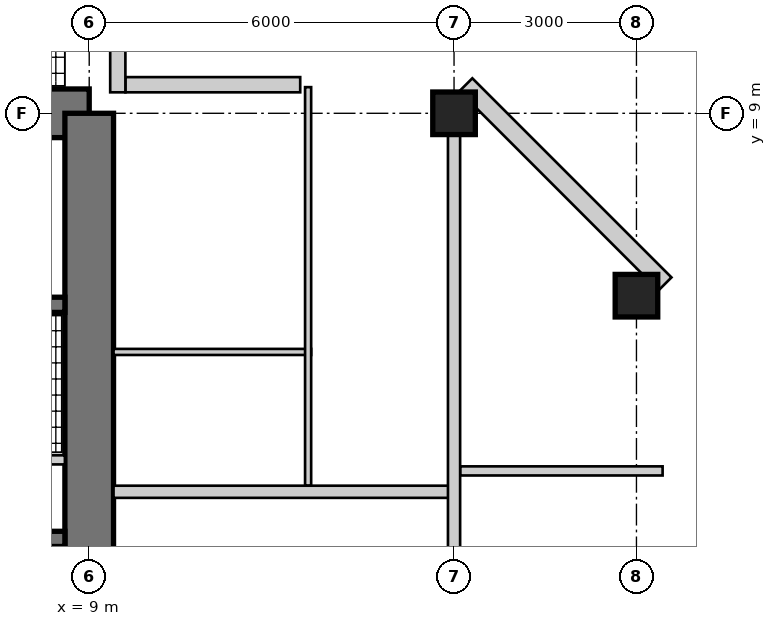
"""IFC4 building model, lengths in metres.
Left out: names, types, materials, properties, quantities, classifications, styles, units other than length and angle.
Written with IfcOpenShell. Run it as: python <this file> out.ifc"""

import sys

from ifc_helpers import new_model, si_unit, direction, frame, frame_2d, origin, origin_2d, place, context, subcontext, project, spatial, rectangle, hollow_rectangle, extrude, element, fill, save


model = new_model("IFC4")
c1 = context("Model", 3, precision=1e-05, world=origin(), true_north=direction((0.0, 1.0)))
c2 = subcontext(c1, "Body", "Model", "MODEL_VIEW")
j1 = project(units=[si_unit("LENGTHUNIT", "METRE"), si_unit("PLANEANGLEUNIT", "RADIAN")], contexts=[c1])
p1 = place(None, origin())
s1 = spatial("IfcSite", under=j1, at=p1, CompositionType="ELEMENT")
p2 = place(p1, origin())
s2 = spatial("IfcBuilding", under=s1, at=p2, CompositionType="ELEMENT")
p3 = place(p2, frame((0.0, 0.0, 278.1)))
s3 = spatial("IfcBuildingStorey", under=s2, at=p3, CompositionType="ELEMENT", Elevation=278.1)
p4 = place(p3, frame((9.0, 9.0, 0.0), z_axis=(0.0, 0.0, 1.0), x_axis=(-1.0, 0.0, 0.0)))
e1 = element("IfcWall", 1, at=p4, inside=s3, PredefinedType="SHEAR", context=c2, shape_type="SweptSolid", body=[
    extrude(rectangle(XDim=18.0, YDim=0.8, at=frame_2d((9.0, 0.0))), origin(), (0.0, 0.0, 1.0), 3.4),
])
p5 = place(p4, frame((9.8, 0.0, 0.0)))
e2 = element("IfcOpeningElement", 2, at=p5, cuts=e1, PredefinedType="OPENING", context=c2, shape_type="SweptSolid", body=[
    extrude(rectangle(XDim=1.0, YDim=2.4, at=frame_2d((0.5, 1.2))), frame((0.0, 0.41, 0.0), z_axis=(0.0, -1.0, 0.0), x_axis=(1.0, 0.0, 0.0)), (0.0, 0.0, 1.0), 0.82),
])
p6 = place(p3, frame((9.0, -9.0, 0.0), z_axis=(0.0, 0.0, 1.0), x_axis=(0.0, 1.0, 0.0)))
e3 = element("IfcWall", 3, at=p6, inside=s3, PredefinedType="SHEAR", context=c2, shape_type="SweptSolid", body=[
    extrude(rectangle(XDim=18.0, YDim=0.8, at=frame_2d((9.0, 0.0))), origin(), (0.0, 0.0, 1.0), 3.4),
])
p7 = place(p6, frame((9.8, 0.0, 0.0)))
e4 = element("IfcOpeningElement", 4, at=p7, cuts=e3, PredefinedType="OPENING", context=c2, shape_type="SweptSolid", body=[
    extrude(rectangle(XDim=1.0, YDim=2.4, at=frame_2d((0.5, 1.2))), frame((0.0, 0.41, 0.0), z_axis=(0.0, -1.0, 0.0), x_axis=(1.0, 0.0, 0.0)), (0.0, 0.0, 1.0), 0.82),
])
p8 = place(p3, frame((1.925, 2.0, 0.0), z_axis=(0.0, 0.0, 1.0), x_axis=(1.0, 0.0, 0.0)))
e5 = element("IfcWall", 5, at=p8, inside=s3, PredefinedType="SHEAR", context=c2, shape_type="SweptSolid", body=[
    extrude(rectangle(XDim=6.675, YDim=0.25, at=frame_2d((3.337, 0.0))), origin(), (0.0, 0.0, 1.0), 3.4),
])
p9 = place(p3, frame((1.925, 5.85, 0.0), z_axis=(0.0, 0.0, 1.0), x_axis=(1.0, 0.0, 0.0)))
e6 = element("IfcWall", 6, at=p9, inside=s3, PredefinedType="SHEAR", context=c2, shape_type="SweptSolid", body=[
    extrude(rectangle(XDim=6.675, YDim=0.25, at=frame_2d((3.337, 0.0))), origin(), (0.0, 0.0, 1.0), 3.4),
])
p10 = place(p9, frame((0.546, 0.0, 0.0)))
e7 = element("IfcOpeningElement", 7, at=p10, cuts=e6, PredefinedType="OPENING", context=c2, shape_type="SweptSolid", body=[
    extrude(rectangle(XDim=1.0, YDim=2.1, at=frame_2d((0.5, 1.05))), frame((0.0, 0.135, 0.0), z_axis=(0.0, -1.0, 0.0), x_axis=(1.0, 0.0, 0.0)), (0.0, 0.0, 1.0), 0.27),
])
p11 = place(p9, frame((5.129, 0.0, 0.0)))
e8 = element("IfcOpeningElement", 8, at=p11, cuts=e6, PredefinedType="OPENING", context=c2, shape_type="SweptSolid", body=[
    extrude(rectangle(XDim=1.0, YDim=2.1, at=frame_2d((0.5, 1.05))), frame((0.0, 0.135, 0.0), z_axis=(0.0, -1.0, 0.0), x_axis=(1.0, 0.0, 0.0)), (0.0, 0.0, 1.0), 0.27),
])
p12 = place(p3, frame((1.925, 3.3, 0.0), z_axis=(0.0, 0.0, 1.0), x_axis=(1.0, 0.0, 0.0)))
e9 = element("IfcWall", 9, at=p12, inside=s3, PredefinedType="PARTITIONING", context=c2, shape_type="SweptSolid", body=[
    extrude(rectangle(XDim=6.675, YDim=0.15, at=frame_2d((3.337, 0.0))), origin(), (0.0, 0.0, 1.0), 3.4),
])
p13 = place(p12, frame((0.075, 0.0, 0.0)))
e10 = element("IfcOpeningElement", 10, at=p13, cuts=e9, PredefinedType="OPENING", context=c2, shape_type="SweptSolid", body=[
    extrude(rectangle(XDim=0.8, YDim=2.1, at=frame_2d((0.4, 1.05))), frame((0.0, 0.085, 0.0), z_axis=(0.0, -1.0, 0.0), x_axis=(1.0, 0.0, 0.0)), (0.0, 0.0, 1.0), 0.17),
])
p14 = place(p12, frame((3.675, 0.0, 0.0)))
e11 = element("IfcOpeningElement", 11, at=p14, cuts=e9, PredefinedType="OPENING", context=c2, shape_type="SweptSolid", body=[
    extrude(rectangle(XDim=0.8, YDim=2.1, at=frame_2d((0.4, 1.05))), frame((0.0, 0.085, 0.0), z_axis=(0.0, -1.0, 0.0), x_axis=(1.0, 0.0, 0.0)), (0.0, 0.0, 1.0), 0.17),
])
for number, where, z_axis, x_axis in (
    (12, (15.0, 9.0, 0.0), (0.0, 0.0, 1.0), (1.0, 0.0, 0.0)),
    (13, (18.0, 6.0, 0.0), (0.0, 0.0, 1.0), (1.0, 0.0, 0.0)),
):
    element("IfcColumn", number, at=place(p3, frame(where, z_axis=z_axis, x_axis=x_axis)), inside=s3, PredefinedType="COLUMN", context=c2, shape_type="SweptSolid", body=[
        extrude(rectangle(XDim=0.7, YDim=0.7, at=origin_2d()), origin(), (0.0, 0.0, 1.0), 3.4),
    ])
p15 = place(p3, frame((18.47, 6.195, 0.0), z_axis=(0.0, 0.0, 1.0), x_axis=(-0.707106781187, 0.707106781187, 0.0)))
e14 = element("IfcWall", 14, at=p15, inside=s3, PredefinedType="SOLIDWALL", context=c2, shape_type="SweptSolid", body=[
    extrude(rectangle(XDim=4.632, YDim=0.3, at=frame_2d((2.316, 0.0))), origin(), (0.0, 0.0, 1.0), 3.22),
])
p16 = place(p15, frame((1.866, 0.0, 0.3)))
e15 = element("IfcOpeningElement", 15, at=p16, cuts=e14, PredefinedType="OPENING", context=c2, shape_type="SweptSolid", body=[
    extrude(rectangle(XDim=0.9, YDim=2.4, at=frame_2d((0.45, 1.2))), frame((0.0, 0.16, 0.0), z_axis=(0.0, -1.0, 0.0), x_axis=(1.0, 0.0, 0.0)), (0.0, 0.0, 1.0), 0.32),
])
p17 = place(p3, frame((12.47, 9.47, 0.0), z_axis=(0.0, 0.0, 1.0), x_axis=(-1.0, 0.0, 0.0)))
e16 = element("IfcWall", 16, at=p17, inside=s3, PredefinedType="SOLIDWALL", context=c2, shape_type="SweptSolid", body=[
    extrude(rectangle(XDim=2.875, YDim=0.25, at=frame_2d((1.438, 0.0))), origin(), (0.0, 0.0, 1.0), 3.22),
])
p18 = place(p17, frame((0.6, 0.0, 0.0)))
e17 = element("IfcOpeningElement", 17, at=p18, cuts=e16, PredefinedType="OPENING", context=c2, shape_type="SweptSolid", body=[
    extrude(rectangle(XDim=1.0, YDim=2.2, at=frame_2d((0.5, 1.1))), frame((0.0, 0.135, 0.0), z_axis=(0.0, -1.0, 0.0), x_axis=(1.0, 0.0, 0.0)), (0.0, 0.0, 1.0), 0.27),
])
p19 = place(p3, frame((9.47, 9.345, 0.0), z_axis=(0.0, 0.0, 1.0), x_axis=(0.0, 1.0, 0.0)))
e18 = element("IfcWall", 18, at=p19, inside=s3, PredefinedType="SOLIDWALL", context=c2, shape_type="SweptSolid", body=[
    extrude(rectangle(XDim=3.125, YDim=0.25, at=frame_2d((1.562, 0.0))), origin(), (0.0, 0.0, 1.0), 3.22),
])
p20 = place(p19, frame((0.6, 0.0, 0.0)))
e19 = element("IfcOpeningElement", 19, at=p20, cuts=e18, PredefinedType="OPENING", context=c2, shape_type="SweptSolid", body=[
    extrude(rectangle(XDim=1.0, YDim=2.2, at=frame_2d((0.5, 1.1))), frame((0.0, 0.135, 0.0), z_axis=(0.0, -1.0, 0.0), x_axis=(1.0, 0.0, 0.0)), (0.0, 0.0, 1.0), 0.27),
])
p21 = place(p3, frame((9.4, 5.075, 0.0), z_axis=(0.0, 0.0, 1.0), x_axis=(1.0, 0.0, 0.0)))
e20 = element("IfcWall", 20, at=p21, inside=s3, PredefinedType="PARTITIONING", context=c2, shape_type="SweptSolid", body=[
    extrude(rectangle(XDim=3.25, YDim=0.1, at=frame_2d((1.625, 0.0))), origin(), (0.0, 0.0, 1.0), 3.22),
])
p22 = place(p3, frame((12.6, 2.875, 0.0), z_axis=(0.0, 0.0, 1.0), x_axis=(0.0, 1.0, 0.0)))
e21 = element("IfcWall", 21, at=p22, inside=s3, PredefinedType="PARTITIONING", context=c2, shape_type="SweptSolid", body=[
    extrude(rectangle(XDim=6.555, YDim=0.1, at=frame_2d((3.277, 0.0))), origin(), (0.0, 0.0, 1.0), 3.22),
])
p23 = place(p22, frame((0.55, 0.0, 0.0)))
e22 = element("IfcOpeningElement", 22, at=p23, cuts=e21, PredefinedType="OPENING", context=c2, shape_type="SweptSolid", body=[
    extrude(rectangle(XDim=0.9, YDim=2.1, at=frame_2d((0.45, 1.05))), frame((0.0, 0.06, 0.0), z_axis=(0.0, -1.0, 0.0), x_axis=(1.0, 0.0, 0.0)), (0.0, 0.0, 1.0), 0.12),
])
p24 = place(p22, frame((2.65, 0.0, 0.0)))
e23 = element("IfcOpeningElement", 23, at=p24, cuts=e21, PredefinedType="OPENING", context=c2, shape_type="SweptSolid", body=[
    extrude(rectangle(XDim=0.9, YDim=2.1, at=frame_2d((0.45, 1.05))), frame((0.0, 0.06, 0.0), z_axis=(0.0, -1.0, 0.0), x_axis=(1.0, 0.0, 0.0)), (0.0, 0.0, 1.0), 0.12),
])
p25 = place(p3, frame((9.4, 2.775, 0.0), z_axis=(0.0, 0.0, 1.0), x_axis=(1.0, 0.0, 0.0)))
e24 = element("IfcWall", 24, at=p25, inside=s3, PredefinedType="SOLIDWALL", context=c2, shape_type="SweptSolid", body=[
    extrude(rectangle(XDim=5.6, YDim=0.2, at=frame_2d((2.8, 0.0))), origin(), (0.0, 0.0, 1.0), 3.22),
])
p26 = place(p25, frame((3.75, 0.0, 0.0)))
e25 = element("IfcOpeningElement", 25, at=p26, cuts=e24, PredefinedType="OPENING", context=c2, shape_type="SweptSolid", body=[
    extrude(rectangle(XDim=1.0, YDim=2.15, at=frame_2d((0.5, 1.075))), frame((0.0, 0.11, 0.0), z_axis=(0.0, -1.0, 0.0), x_axis=(1.0, 0.0, 0.0)), (0.0, 0.0, 1.0), 0.22),
])
p27 = place(p3, frame((15.1, 3.118, 0.0), z_axis=(0.0, 0.0, 1.0), x_axis=(1.0, 0.0, 0.0)))
e26 = element("IfcWall", 26, at=p27, inside=s3, PredefinedType="PARTITIONING", context=c2, shape_type="SweptSolid", body=[
    extrude(rectangle(XDim=3.33, YDim=0.15, at=frame_2d((1.665, 0.0))), origin(), (0.0, 0.0, 1.0), 3.22),
])
p28 = place(p27, frame((0.6, 0.0, 0.0)))
e27 = element("IfcOpeningElement", 27, at=p28, cuts=e26, PredefinedType="OPENING", context=c2, shape_type="SweptSolid", body=[
    extrude(rectangle(XDim=1.0, YDim=2.1, at=frame_2d((0.5, 1.05))), frame((0.0, 0.085, 0.0), z_axis=(0.0, -1.0, 0.0), x_axis=(1.0, 0.0, 0.0)), (0.0, 0.0, 1.0), 0.17),
])
p29 = place(p3, frame((15.0, 0.3, 0.0), z_axis=(0.0, 0.0, 1.0), x_axis=(0.0, 1.0, 0.0)))
e28 = element("IfcWall", 28, at=p29, inside=s3, PredefinedType="SOLIDWALL", context=c2, shape_type="SweptSolid", body=[
    extrude(rectangle(XDim=8.35, YDim=0.2, at=frame_2d((4.175, 0.0))), origin(), (0.0, 0.0, 1.0), 2.52),
])
p30 = place(p29, frame((0.4, 0.0, 0.0)))
e29 = element("IfcOpeningElement", 29, at=p30, cuts=e28, PredefinedType="OPENING", context=c2, shape_type="SweptSolid", body=[
    extrude(rectangle(XDim=1.0, YDim=2.2, at=frame_2d((0.5, 1.1))), frame((0.0, 0.11, 0.0), z_axis=(0.0, -1.0, 0.0), x_axis=(1.0, 0.0, 0.0)), (0.0, 0.0, 1.0), 0.22),
])
p31 = place(p16, origin())
e30 = element("IfcWindow", 30, at=p31, inside=s3, PartitioningType="SINGLE_PANEL", PredefinedType="WINDOW", context=c2, shape_type="SweptSolid", body=[
    extrude(hollow_rectangle(XDim=0.9, YDim=2.4, WallThickness=0.06, at=frame_2d((0.45, 1.2))), frame((0.0, 0.03, 0.0), z_axis=(0.0, -1.0, 0.0), x_axis=(1.0, 0.0, 0.0)), (0.0, 0.0, 1.0), 0.06),
    extrude(rectangle(XDim=0.779, YDim=2.279, at=frame_2d((0.45, 1.2))), frame((0.0, 0.03, 0.0), z_axis=(0.0, -1.0, 0.0), x_axis=(1.0, 0.0, 0.0)), (0.0, 0.0, 1.0), 0.06),
])
fill(e15, e30)
p32 = place(p18, origin())
e31 = element("IfcDoor", 31, at=p32, inside=s3, OperationType="SINGLE_SWING_LEFT", PredefinedType="DOOR", context=c2, shape_type="SweptSolid", body=[
    extrude(hollow_rectangle(XDim=1.0, YDim=2.2, WallThickness=0.06, at=frame_2d((0.5, 1.1))), frame((0.0, 0.025, 0.0), z_axis=(0.0, -1.0, 0.0), x_axis=(1.0, 0.0, 0.0)), (0.0, 0.0, 1.0), 0.05),
    extrude(rectangle(XDim=0.879, YDim=2.079, at=frame_2d((0.5, 1.1))), frame((0.0, 0.025, 0.0), z_axis=(0.0, -1.0, 0.0), x_axis=(1.0, 0.0, 0.0)), (0.0, 0.0, 1.0), 0.05),
])
fill(e17, e31)
p33 = place(p20, origin())
e32 = element("IfcDoor", 32, at=p33, inside=s3, OperationType="SINGLE_SWING_LEFT", PredefinedType="DOOR", context=c2, shape_type="SweptSolid", body=[
    extrude(hollow_rectangle(XDim=1.0, YDim=2.2, WallThickness=0.06, at=frame_2d((0.5, 1.1))), frame((0.0, 0.025, 0.0), z_axis=(0.0, -1.0, 0.0), x_axis=(1.0, 0.0, 0.0)), (0.0, 0.0, 1.0), 0.05),
    extrude(rectangle(XDim=0.879, YDim=2.079, at=frame_2d((0.5, 1.1))), frame((0.0, 0.025, 0.0), z_axis=(0.0, -1.0, 0.0), x_axis=(1.0, 0.0, 0.0)), (0.0, 0.0, 1.0), 0.05),
])
fill(e19, e32)
p34 = place(p23, origin())
e33 = element("IfcDoor", 33, at=p34, inside=s3, OperationType="SINGLE_SWING_LEFT", PredefinedType="DOOR", context=c2, shape_type="SweptSolid", body=[
    extrude(rectangle(XDim=0.9, YDim=2.1, at=frame_2d((0.45, 1.05))), frame((0.0, 0.025, 0.0), z_axis=(0.0, -1.0, 0.0), x_axis=(1.0, 0.0, 0.0)), (0.0, 0.0, 1.0), 0.05),
])
fill(e22, e33)
p35 = place(p24, origin())
e34 = element("IfcDoor", 34, at=p35, inside=s3, OperationType="SINGLE_SWING_LEFT", PredefinedType="DOOR", context=c2, shape_type="SweptSolid", body=[
    extrude(rectangle(XDim=0.9, YDim=2.1, at=frame_2d((0.45, 1.05))), frame((0.0, 0.025, 0.0), z_axis=(0.0, -1.0, 0.0), x_axis=(1.0, 0.0, 0.0)), (0.0, 0.0, 1.0), 0.05),
])
fill(e23, e34)
p36 = place(p26, origin())
e35 = element("IfcDoor", 35, at=p36, inside=s3, OperationType="SINGLE_SWING_LEFT", PredefinedType="DOOR", context=c2, shape_type="SweptSolid", body=[
    extrude(rectangle(XDim=1.0, YDim=2.15, at=frame_2d((0.5, 1.075))), frame((0.0, 0.025, 0.0), z_axis=(0.0, -1.0, 0.0), x_axis=(1.0, 0.0, 0.0)), (0.0, 0.0, 1.0), 0.05),
])
fill(e25, e35)
p37 = place(p28, frame((1.0, 0.0, 0.0), z_axis=(0.0, 0.0, 1.0), x_axis=(-1.0, 0.0, 0.0)))
e36 = element("IfcDoor", 36, at=p37, inside=s3, OperationType="SINGLE_SWING_RIGHT", PredefinedType="DOOR", context=c2, shape_type="SweptSolid", body=[
    extrude(rectangle(XDim=1.0, YDim=2.1, at=frame_2d((0.5, 1.05))), frame((0.0, 0.025, 0.0), z_axis=(0.0, -1.0, 0.0), x_axis=(1.0, 0.0, 0.0)), (0.0, 0.0, 1.0), 0.05),
])
fill(e27, e36)
save(model, sys.argv[1])
